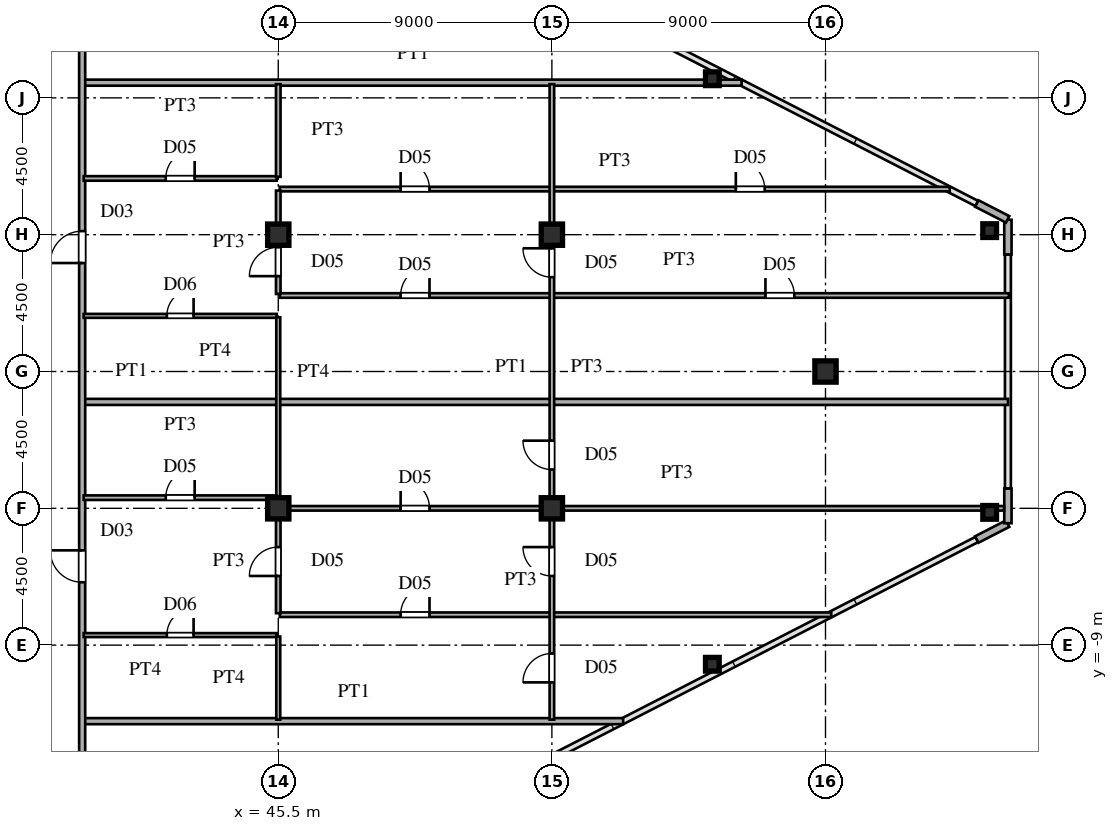
"""IFC4 building model, lengths in metres.
Left out: names, types, materials, properties, quantities, classifications, styles, units other than length and angle.
Written with IfcOpenShell. Run it as: python <this file> out.ifc"""

import sys

from ifc_helpers import new_model, si_unit, direction, frame, frame_2d, origin, origin_2d, place, context, subcontext, project, spatial, rectangle, hollow_rectangle, i_section, extrude, source, transform, mapped, element, fill, save


model = new_model("IFC4")
c1 = context("Model", 3, precision=1e-05, world=origin(), true_north=direction((0.0, 1.0)))
c2 = subcontext(c1, "Body", "Model", "MODEL_VIEW")
j1 = project(units=[si_unit("LENGTHUNIT", "METRE"), si_unit("PLANEANGLEUNIT", "RADIAN")], contexts=[c1])
p1 = place(None, origin())
s1 = spatial("IfcSite", under=j1, at=p1, CompositionType="ELEMENT")
p2 = place(p1, origin())
s2 = spatial("IfcBuilding", under=s1, at=p2, CompositionType="ELEMENT")
p3 = place(p2, frame((0.0, 0.0, 140.4)))
s3 = spatial("IfcBuildingStorey", under=s2, at=p3, CompositionType="ELEMENT", Elevation=140.4)
m1 = source(origin(), c2, "Body", "SweptSolid", [
    extrude(i_section(OverallWidth=0.7, OverallDepth=0.7, WebThickness=0.028, FlangeThickness=0.045, at=origin_2d()), origin(), (0.0, 0.0, 1.0), 3.6),
])
for number, where, z_axis, x_axis in (
    (1, (45.5, -4.5, 0.0), (0.0, 0.0, 1.0), (1.0, 0.0, 0.0)),
    (2, (45.5, 4.5, 0.0), (0.0, 0.0, 1.0), (1.0, 0.0, 0.0)),
    (3, (54.5, -4.5, 0.0), (0.0, 0.0, 1.0), (1.0, 0.0, 0.0)),
    (4, (54.5, 4.5, 0.0), (0.0, 0.0, 1.0), (1.0, 0.0, 0.0)),
    (5, (63.5, 0.0, 0.0), (0.0, 0.0, 1.0), (1.0, 0.0, 0.0)),
):
    element("IfcColumn", number, at=place(p3, frame(where, z_axis=z_axis, x_axis=x_axis)), inside=s3, PredefinedType="COLUMN", context=c2, shape_type="MappedRepresentation", body=[
        mapped(m1, transform((0.0, 0.0, 0.0), scale=1.0)),
    ])
m2 = source(origin(), c2, "Body", "SweptSolid", [
    extrude(hollow_rectangle(XDim=0.45, YDim=0.45, WallThickness=0.018, at=origin_2d()), origin(), (0.0, 0.0, 1.0), 3.6),
])
for number, where, z_axis, x_axis in (
    (6, (68.9, -4.634, 0.0), (0.0, 0.0, 1.0), (1.0, 0.0, 0.0)),
    (7, (68.9, 4.634, 0.0), (0.0, 0.0, 1.0), (1.0, 0.0, 0.0)),
    (8, (59.779, -9.629, 0.0), (0.0, 0.0, 1.0), (1.0, 0.0, 0.0)),
    (9, (59.779, 9.629, 0.0), (0.0, 0.0, 1.0), (1.0, 0.0, 0.0)),
):
    element("IfcColumn", number, at=place(p3, frame(where, z_axis=z_axis, x_axis=x_axis)), inside=s3, PredefinedType="COLUMN", context=c2, shape_type="MappedRepresentation", body=[
        mapped(m2, transform((0.0, 0.0, 0.0), scale=1.0)),
    ])
p4 = place(p3, frame((68.477, -5.525, 0.0), z_axis=(0.0, 0.0, 1.0), x_axis=(0.889797395748, 0.456355776255, 0.0)))
e10 = element("IfcWall", 10, at=p4, inside=s3, PredefinedType="SOLIDWALL", context=c2, shape_type="SweptSolid", body=[
    extrude(rectangle(XDim=1.14, YDim=0.24, at=frame_2d((0.57, 0.0))), origin(), (0.0, 0.0, 1.0), 3.38),
])
for number, where, z_axis, x_axis in (
    (11, (69.5, -4.99, 0.0), (0.0, 0.0, 1.0), (0.0, 1.0, 0.0)),
    (12, (69.5, 3.85, 0.0), (0.0, 0.0, 1.0), (0.0, 1.0, 0.0)),
):
    element("IfcWall", number, at=place(p3, frame(where, z_axis=z_axis, x_axis=x_axis)), inside=s3, PredefinedType="SOLIDWALL", context=c2, shape_type="SweptSolid", body=[
        extrude(rectangle(XDim=1.14, YDim=0.24, at=frame_2d((0.57, 0.0))), origin(), (0.0, 0.0, 1.0), 3.38),
    ])
p5 = place(p3, frame((69.491, 5.005, 0.0), z_axis=(0.0, 0.0, 1.0), x_axis=(-0.889797395748, 0.456355776255, 0.0)))
e13 = element("IfcWall", 13, at=p5, inside=s3, PredefinedType="SOLIDWALL", context=c2, shape_type="SweptSolid", body=[
    extrude(rectangle(XDim=1.14, YDim=0.24, at=frame_2d((0.57, 0.0))), origin(), (0.0, 0.0, 1.0), 3.38),
])
p6 = place(p3, frame((39.13, -11.5, 0.0), z_axis=(0.0, 0.0, 1.0), x_axis=(1.0, 0.0, 0.0)))
e14 = element("IfcWall", 14, at=p6, inside=s3, PredefinedType="PARTITIONING", context=c2, shape_type="SweptSolid", body=[
    extrude(rectangle(XDim=17.714, YDim=0.2, at=frame_2d((8.857, 0.0))), origin(), (0.0, 0.0, 1.0), 3.38),
])
p7 = place(p3, frame((39.1, -8.67, 0.0), z_axis=(0.0, 0.0, 1.0), x_axis=(1.0, 0.0, 0.0)))
e15 = element("IfcWall", 15, at=p7, inside=s3, PredefinedType="PARTITIONING", context=c2, shape_type="SweptSolid", body=[
    extrude(rectangle(XDim=6.35, YDim=0.13, at=frame_2d((3.175, 0.0))), origin(), (0.0, 0.0, 1.0), 3.38),
])
p8 = place(p7, frame((2.735, 0.0, 0.0)))
e16 = element("IfcOpeningElement", 16, at=p8, cuts=e15, PredefinedType="OPENING", context=c2, shape_type="SweptSolid", body=[
    extrude(rectangle(XDim=0.88, YDim=2.1, at=frame_2d((0.44, 1.05))), frame((0.0, 0.075, 0.0), z_axis=(0.0, -1.0, 0.0), x_axis=(1.0, 0.0, 0.0)), (0.0, 0.0, 1.0), 0.15),
])
p9 = place(p3, frame((45.55, -8.0, 0.0), z_axis=(0.0, 0.0, 1.0), x_axis=(1.0, 0.0, 0.0)))
e17 = element("IfcWall", 17, at=p9, inside=s3, PredefinedType="PARTITIONING", context=c2, shape_type="SweptSolid", body=[
    extrude(rectangle(XDim=18.139, YDim=0.15, at=frame_2d((9.069, 0.0))), origin(), (0.0, 0.0, 1.0), 3.38),
])
p10 = place(p9, frame((3.975, 0.0, 0.0)))
e18 = element("IfcOpeningElement", 18, at=p10, cuts=e17, PredefinedType="OPENING", context=c2, shape_type="SweptSolid", body=[
    extrude(rectangle(XDim=0.95, YDim=2.15, at=frame_2d((0.475, 1.075))), frame((0.0, 0.085, 0.0), z_axis=(0.0, -1.0, 0.0), x_axis=(1.0, 0.0, 0.0)), (0.0, 0.0, 1.0), 0.17),
])
p11 = place(p3, frame((45.55, -4.5, 0.0), z_axis=(0.0, 0.0, 1.0), x_axis=(1.0, 0.0, 0.0)))
e19 = element("IfcWall", 19, at=p11, inside=s3, PredefinedType="PARTITIONING", context=c2, shape_type="SweptSolid", body=[
    extrude(rectangle(XDim=23.825, YDim=0.15, at=frame_2d((11.913, 0.0))), origin(), (0.0, 0.0, 1.0), 2.78),
])
p12 = place(p11, frame((3.975, 0.0, 0.0)))
e20 = element("IfcOpeningElement", 20, at=p12, cuts=e19, PredefinedType="OPENING", context=c2, shape_type="SweptSolid", body=[
    extrude(rectangle(XDim=0.95, YDim=2.15, at=frame_2d((0.475, 1.075))), frame((0.0, 0.085, 0.0), z_axis=(0.0, -1.0, 0.0), x_axis=(1.0, 0.0, 0.0)), (0.0, 0.0, 1.0), 0.17),
])
p13 = place(p3, frame((39.1, -4.15, 0.0), z_axis=(0.0, 0.0, 1.0), x_axis=(1.0, 0.0, 0.0)))
e21 = element("IfcWall", 21, at=p13, inside=s3, PredefinedType="PARTITIONING", context=c2, shape_type="SweptSolid", body=[
    extrude(rectangle(XDim=6.35, YDim=0.15, at=frame_2d((3.175, 0.0))), origin(), (0.0, 0.0, 1.0), 3.38),
])
p14 = place(p13, frame((2.7, 0.0, 0.0)))
e22 = element("IfcOpeningElement", 22, at=p14, cuts=e21, PredefinedType="OPENING", context=c2, shape_type="SweptSolid", body=[
    extrude(rectangle(XDim=0.95, YDim=2.15, at=frame_2d((0.475, 1.075))), frame((0.0, 0.085, 0.0), z_axis=(0.0, -1.0, 0.0), x_axis=(1.0, 0.0, 0.0)), (0.0, 0.0, 1.0), 0.17),
])
p15 = place(p3, frame((39.13, -1.0, 0.0), z_axis=(0.0, 0.0, 1.0), x_axis=(1.0, 0.0, 0.0)))
e23 = element("IfcWall", 23, at=p15, inside=s3, PredefinedType="PARTITIONING", context=c2, shape_type="SweptSolid", body=[
    extrude(rectangle(XDim=30.375, YDim=0.2, at=frame_2d((15.188, 0.0))), origin(), (0.0, 0.0, 1.0), 3.38),
])
p16 = place(p3, frame((39.1, 1.83, 0.0), z_axis=(0.0, 0.0, 1.0), x_axis=(1.0, 0.0, 0.0)))
e24 = element("IfcWall", 24, at=p16, inside=s3, PredefinedType="PARTITIONING", context=c2, shape_type="SweptSolid", body=[
    extrude(rectangle(XDim=6.35, YDim=0.13, at=frame_2d((3.175, 0.0))), origin(), (0.0, 0.0, 1.0), 3.38),
])
p17 = place(p16, frame((2.735, 0.0, 0.0)))
e25 = element("IfcOpeningElement", 25, at=p17, cuts=e24, PredefinedType="OPENING", context=c2, shape_type="SweptSolid", body=[
    extrude(rectangle(XDim=0.88, YDim=2.1, at=frame_2d((0.44, 1.05))), frame((0.0, 0.075, 0.0), z_axis=(0.0, -1.0, 0.0), x_axis=(1.0, 0.0, 0.0)), (0.0, 0.0, 1.0), 0.15),
])
p18 = place(p3, frame((45.55, 2.5, 0.0), z_axis=(0.0, 0.0, 1.0), x_axis=(1.0, 0.0, 0.0)))
e26 = element("IfcWall", 26, at=p18, inside=s3, PredefinedType="PARTITIONING", context=c2, shape_type="SweptSolid", body=[
    extrude(rectangle(XDim=23.985, YDim=0.15, at=frame_2d((11.992, 0.0))), origin(), (0.0, 0.0, 1.0), 3.38),
])
p19 = place(p18, frame((3.975, 0.0, 0.0)))
e27 = element("IfcOpeningElement", 27, at=p19, cuts=e26, PredefinedType="OPENING", context=c2, shape_type="SweptSolid", body=[
    extrude(rectangle(XDim=0.95, YDim=2.15, at=frame_2d((0.475, 1.075))), frame((0.0, 0.085, 0.0), z_axis=(0.0, -1.0, 0.0), x_axis=(1.0, 0.0, 0.0)), (0.0, 0.0, 1.0), 0.17),
])
p20 = place(p18, frame((15.975, 0.0, 0.0)))
e28 = element("IfcOpeningElement", 28, at=p20, cuts=e26, PredefinedType="OPENING", context=c2, shape_type="SweptSolid", body=[
    extrude(rectangle(XDim=0.95, YDim=2.15, at=frame_2d((0.475, 1.075))), frame((0.0, 0.085, 0.0), z_axis=(0.0, -1.0, 0.0), x_axis=(1.0, 0.0, 0.0)), (0.0, 0.0, 1.0), 0.17),
])
p21 = place(p3, frame((45.55, 6.0, 0.0), z_axis=(0.0, 0.0, 1.0), x_axis=(1.0, 0.0, 0.0)))
e29 = element("IfcWall", 29, at=p21, inside=s3, PredefinedType="PARTITIONING", context=c2, shape_type="SweptSolid", body=[
    extrude(rectangle(XDim=22.036, YDim=0.15, at=frame_2d((11.018, 0.0))), origin(), (0.0, 0.0, 1.0), 3.38),
])
p22 = place(p21, frame((3.975, 0.0, 0.0)))
e30 = element("IfcOpeningElement", 30, at=p22, cuts=e29, PredefinedType="OPENING", context=c2, shape_type="SweptSolid", body=[
    extrude(rectangle(XDim=0.95, YDim=2.15, at=frame_2d((0.475, 1.075))), frame((0.0, 0.085, 0.0), z_axis=(0.0, -1.0, 0.0), x_axis=(1.0, 0.0, 0.0)), (0.0, 0.0, 1.0), 0.17),
])
p23 = place(p21, frame((15.001, 0.0, 0.0)))
e31 = element("IfcOpeningElement", 31, at=p23, cuts=e29, PredefinedType="OPENING", context=c2, shape_type="SweptSolid", body=[
    extrude(rectangle(XDim=0.95, YDim=2.15, at=frame_2d((0.475, 1.075))), frame((0.0, 0.085, 0.0), z_axis=(0.0, -1.0, 0.0), x_axis=(1.0, 0.0, 0.0)), (0.0, 0.0, 1.0), 0.17),
])
p24 = place(p3, frame((39.1, 6.35, 0.0), z_axis=(0.0, 0.0, 1.0), x_axis=(1.0, 0.0, 0.0)))
e32 = element("IfcWall", 32, at=p24, inside=s3, PredefinedType="PARTITIONING", context=c2, shape_type="SweptSolid", body=[
    extrude(rectangle(XDim=6.35, YDim=0.15, at=frame_2d((3.175, 0.0))), origin(), (0.0, 0.0, 1.0), 3.38),
])
p25 = place(p24, frame((2.7, 0.0, 0.0)))
e33 = element("IfcOpeningElement", 33, at=p25, cuts=e32, PredefinedType="OPENING", context=c2, shape_type="SweptSolid", body=[
    extrude(rectangle(XDim=0.95, YDim=2.15, at=frame_2d((0.475, 1.075))), frame((0.0, 0.085, 0.0), z_axis=(0.0, -1.0, 0.0), x_axis=(1.0, 0.0, 0.0)), (0.0, 0.0, 1.0), 0.17),
])
p26 = place(p3, frame((39.13, 9.5, 0.0), z_axis=(0.0, 0.0, 1.0), x_axis=(1.0, 0.0, 0.0)))
e34 = element("IfcWall", 34, at=p26, inside=s3, PredefinedType="PARTITIONING", context=c2, shape_type="SweptSolid", body=[
    extrude(rectangle(XDim=21.612, YDim=0.2, at=frame_2d((10.806, 0.0))), origin(), (0.0, 0.0, 1.0), 3.38),
])
p27 = place(p3, frame((39.05, -15.715, 0.0), z_axis=(0.0, 0.0, 1.0), x_axis=(0.0, 1.0, 0.0)))
e35 = element("IfcWall", 35, at=p27, inside=s3, PredefinedType="PARTITIONING", context=c2, shape_type="SweptSolid", body=[
    extrude(rectangle(XDim=31.43, YDim=0.2, at=frame_2d((15.715, 0.0))), origin(), (0.0, 0.0, 1.0), 3.38),
])
p28 = place(p27, frame((1.54, 0.0, 0.0)))
e36 = element("IfcOpeningElement", 36, at=p28, cuts=e35, PredefinedType="OPENING", context=c2, shape_type="SweptSolid", body=[
    extrude(rectangle(XDim=1.05, YDim=2.25, at=frame_2d((0.525, 1.125))), frame((0.0, 0.11, 0.0), z_axis=(0.0, -1.0, 0.0), x_axis=(1.0, 0.0, 0.0)), (0.0, 0.0, 1.0), 0.22),
])
p29 = place(p27, frame((8.782, 0.0, 0.0)))
e37 = element("IfcOpeningElement", 37, at=p29, cuts=e35, PredefinedType="OPENING", context=c2, shape_type="SweptSolid", body=[
    extrude(rectangle(XDim=1.05, YDim=2.25, at=frame_2d((0.525, 1.125))), frame((0.0, 0.11, 0.0), z_axis=(0.0, -1.0, 0.0), x_axis=(1.0, 0.0, 0.0)), (0.0, 0.0, 1.0), 0.22),
])
p30 = place(p27, frame((19.282, 0.0, 0.0)))
e38 = element("IfcOpeningElement", 38, at=p30, cuts=e35, PredefinedType="OPENING", context=c2, shape_type="SweptSolid", body=[
    extrude(rectangle(XDim=1.05, YDim=2.25, at=frame_2d((0.525, 1.125))), frame((0.0, 0.11, 0.0), z_axis=(0.0, -1.0, 0.0), x_axis=(1.0, 0.0, 0.0)), (0.0, 0.0, 1.0), 0.22),
])
p31 = place(p27, frame((27.84, 0.0, 0.0)))
e39 = element("IfcOpeningElement", 39, at=p31, cuts=e35, PredefinedType="OPENING", context=c2, shape_type="SweptSolid", body=[
    extrude(rectangle(XDim=1.05, YDim=2.25, at=frame_2d((0.525, 1.125))), frame((0.0, 0.11, 0.0), z_axis=(0.0, -1.0, 0.0), x_axis=(1.0, 0.0, 0.0)), (0.0, 0.0, 1.0), 0.22),
])
p32 = place(p3, frame((45.5, -11.45, 0.0), z_axis=(0.0, 0.0, 1.0), x_axis=(0.0, 1.0, 0.0)))
e40 = element("IfcWall", 40, at=p32, inside=s3, PredefinedType="PARTITIONING", context=c2, shape_type="SweptSolid", body=[
    extrude(rectangle(XDim=2.733, YDim=0.13, at=frame_2d((1.366, 0.0))), origin(), (0.0, 0.0, 1.0), 2.78),
])
p33 = place(p3, frame((45.5, -7.95, 0.0), z_axis=(0.0, 0.0, 1.0), x_axis=(0.0, 1.0, 0.0)))
e41 = element("IfcWall", 41, at=p33, inside=s3, PredefinedType="PARTITIONING", context=c2, shape_type="SweptSolid", body=[
    extrude(rectangle(XDim=3.4, YDim=0.15, at=frame_2d((1.7, 0.0))), origin(), (0.0, 0.0, 1.0), 2.78),
])
p34 = place(p33, frame((1.225, 0.0, 0.0)))
e42 = element("IfcOpeningElement", 42, at=p34, cuts=e41, PredefinedType="OPENING", context=c2, shape_type="SweptSolid", body=[
    extrude(rectangle(XDim=0.95, YDim=2.15, at=frame_2d((0.475, 1.075))), frame((0.0, 0.085, 0.0), z_axis=(0.0, -1.0, 0.0), x_axis=(1.0, 0.0, 0.0)), (0.0, 0.0, 1.0), 0.17),
])
p35 = place(p3, frame((45.5, -4.098, 0.0), z_axis=(0.0, 0.0, 1.0), x_axis=(0.0, 1.0, 0.0)))
e43 = element("IfcWall", 43, at=p35, inside=s3, PredefinedType="PARTITIONING", context=c2, shape_type="SweptSolid", body=[
    extrude(rectangle(XDim=5.881, YDim=0.13, at=frame_2d((2.94, 0.0))), origin(), (0.0, 0.0, 1.0), 2.78),
])
p36 = place(p3, frame((45.5, 2.55, 0.0), z_axis=(0.0, 0.0, 1.0), x_axis=(0.0, 1.0, 0.0)))
e44 = element("IfcWall", 44, at=p36, inside=s3, PredefinedType="PARTITIONING", context=c2, shape_type="SweptSolid", body=[
    extrude(rectangle(XDim=3.4, YDim=0.15, at=frame_2d((1.7, 0.0))), origin(), (0.0, 0.0, 1.0), 2.78),
])
p37 = place(p36, frame((0.586, 0.0, 0.0)))
e45 = element("IfcOpeningElement", 45, at=p37, cuts=e44, PredefinedType="OPENING", context=c2, shape_type="SweptSolid", body=[
    extrude(rectangle(XDim=0.95, YDim=2.15, at=frame_2d((0.475, 1.075))), frame((0.0, 0.085, 0.0), z_axis=(0.0, -1.0, 0.0), x_axis=(1.0, 0.0, 0.0)), (0.0, 0.0, 1.0), 0.17),
])
p38 = place(p3, frame((45.5, 6.402, 0.0), z_axis=(0.0, 0.0, 1.0), x_axis=(0.0, 1.0, 0.0)))
e46 = element("IfcWall", 46, at=p38, inside=s3, PredefinedType="PARTITIONING", context=c2, shape_type="SweptSolid", body=[
    extrude(rectangle(XDim=3.048, YDim=0.15, at=frame_2d((1.524, 0.0))), origin(), (0.0, 0.0, 1.0), 2.78),
])
p39 = place(p3, frame((54.5, -11.45, 0.0), z_axis=(0.0, 0.0, 1.0), x_axis=(0.0, 1.0, 0.0)))
e47 = element("IfcWall", 47, at=p39, inside=s3, PredefinedType="PARTITIONING", context=c2, shape_type="SweptSolid", body=[
    extrude(rectangle(XDim=20.9, YDim=0.15, at=frame_2d((10.45, 0.0))), origin(), (0.0, 0.0, 1.0), 2.78),
])
p40 = place(p39, frame((4.725, 0.0, 0.0)))
e48 = element("IfcOpeningElement", 48, at=p40, cuts=e47, PredefinedType="OPENING", context=c2, shape_type="SweptSolid", body=[
    extrude(rectangle(XDim=0.95, YDim=2.15, at=frame_2d((0.475, 1.075))), frame((0.0, 0.085, 0.0), z_axis=(0.0, -1.0, 0.0), x_axis=(1.0, 0.0, 0.0)), (0.0, 0.0, 1.0), 0.17),
])
p41 = place(p39, frame((1.225, 0.0, 0.0)))
e49 = element("IfcOpeningElement", 49, at=p41, cuts=e47, PredefinedType="OPENING", context=c2, shape_type="SweptSolid", body=[
    extrude(rectangle(XDim=0.95, YDim=2.15, at=frame_2d((0.475, 1.075))), frame((0.0, 0.085, 0.0), z_axis=(0.0, -1.0, 0.0), x_axis=(1.0, 0.0, 0.0)), (0.0, 0.0, 1.0), 0.17),
])
p42 = place(p39, frame((8.225, 0.0, 0.0)))
e50 = element("IfcOpeningElement", 50, at=p42, cuts=e47, PredefinedType="OPENING", context=c2, shape_type="SweptSolid", body=[
    extrude(rectangle(XDim=0.95, YDim=2.15, at=frame_2d((0.475, 1.075))), frame((0.0, 0.085, 0.0), z_axis=(0.0, -1.0, 0.0), x_axis=(1.0, 0.0, 0.0)), (0.0, 0.0, 1.0), 0.17),
])
p43 = place(p39, frame((14.552, 0.0, 0.0)))
e51 = element("IfcOpeningElement", 51, at=p43, cuts=e47, PredefinedType="OPENING", context=c2, shape_type="SweptSolid", body=[
    extrude(rectangle(XDim=0.95, YDim=2.15, at=frame_2d((0.475, 1.075))), frame((0.0, 0.085, 0.0), z_axis=(0.0, -1.0, 0.0), x_axis=(1.0, 0.0, 0.0)), (0.0, 0.0, 1.0), 0.17),
])
m3 = source(origin(), c2, "Body", "SweptSolid", [
    extrude(rectangle(XDim=0.88, YDim=2.1, at=frame_2d((0.44, 1.05))), frame((0.0, 0.025, 0.0), z_axis=(0.0, -1.0, 0.0), x_axis=(1.0, 0.0, 0.0)), (0.0, 0.0, 1.0), 0.05),
])
p44 = place(p8, origin())
e52 = element("IfcDoor", 52, at=p44, inside=s3, OperationType="SINGLE_SWING_RIGHT", PredefinedType="DOOR", context=c2, shape_type="MappedRepresentation", body=[
    mapped(m3, transform((0.0, 0.0, 0.0), scale=1.0)),
])
fill(e16, e52)
m4 = source(origin(), c2, "Body", "SweptSolid", [
    extrude(rectangle(XDim=0.95, YDim=2.15, at=frame_2d((0.475, 1.075))), frame((0.0, 0.025, 0.0), z_axis=(0.0, -1.0, 0.0), x_axis=(1.0, 0.0, 0.0)), (0.0, 0.0, 1.0), 0.05),
])
p45 = place(p10, origin())
e53 = element("IfcDoor", 53, at=p45, inside=s3, OperationType="SINGLE_SWING_RIGHT", PredefinedType="DOOR", context=c2, shape_type="MappedRepresentation", body=[
    mapped(m4, transform((0.0, 0.0, 0.0), scale=1.0)),
])
fill(e18, e53)
p46 = place(p12, origin())
e54 = element("IfcDoor", 54, at=p46, inside=s3, OperationType="SINGLE_SWING_LEFT", PredefinedType="DOOR", context=c2, shape_type="MappedRepresentation", body=[
    mapped(m4, transform((0.0, 0.0, 0.0), scale=1.0)),
])
fill(e20, e54)
p47 = place(p14, origin())
e55 = element("IfcDoor", 55, at=p47, inside=s3, OperationType="SINGLE_SWING_RIGHT", PredefinedType="DOOR", context=c2, shape_type="MappedRepresentation", body=[
    mapped(m4, transform((0.0, 0.0, 0.0), scale=1.0)),
])
fill(e22, e55)
p48 = place(p17, origin())
e56 = element("IfcDoor", 56, at=p48, inside=s3, OperationType="SINGLE_SWING_RIGHT", PredefinedType="DOOR", context=c2, shape_type="MappedRepresentation", body=[
    mapped(m3, transform((0.0, 0.0, 0.0), scale=1.0)),
])
fill(e25, e56)
p49 = place(p19, origin())
e57 = element("IfcDoor", 57, at=p49, inside=s3, OperationType="SINGLE_SWING_RIGHT", PredefinedType="DOOR", context=c2, shape_type="MappedRepresentation", body=[
    mapped(m4, transform((0.0, 0.0, 0.0), scale=1.0)),
])
fill(e27, e57)
p50 = place(p20, origin())
e58 = element("IfcDoor", 58, at=p50, inside=s3, OperationType="SINGLE_SWING_LEFT", PredefinedType="DOOR", context=c2, shape_type="MappedRepresentation", body=[
    mapped(m4, transform((0.0, 0.0, 0.0), scale=1.0)),
])
fill(e28, e58)
p51 = place(p22, origin())
e59 = element("IfcDoor", 59, at=p51, inside=s3, OperationType="SINGLE_SWING_LEFT", PredefinedType="DOOR", context=c2, shape_type="MappedRepresentation", body=[
    mapped(m4, transform((0.0, 0.0, 0.0), scale=1.0)),
])
fill(e30, e59)
p52 = place(p23, origin())
e60 = element("IfcDoor", 60, at=p52, inside=s3, OperationType="SINGLE_SWING_LEFT", PredefinedType="DOOR", context=c2, shape_type="MappedRepresentation", body=[
    mapped(m4, transform((0.0, 0.0, 0.0), scale=1.0)),
])
fill(e31, e60)
p53 = place(p25, origin())
e61 = element("IfcDoor", 61, at=p53, inside=s3, OperationType="SINGLE_SWING_RIGHT", PredefinedType="DOOR", context=c2, shape_type="MappedRepresentation", body=[
    mapped(m4, transform((0.0, 0.0, 0.0), scale=1.0)),
])
fill(e33, e61)
m5 = source(origin(), c2, "Body", "SweptSolid", [
    extrude(rectangle(XDim=1.05, YDim=2.25, at=frame_2d((0.525, 1.125))), frame((0.0, 0.025, 0.0), z_axis=(0.0, -1.0, 0.0), x_axis=(1.0, 0.0, 0.0)), (0.0, 0.0, 1.0), 0.05),
])
p54 = place(p29, origin())
e62 = element("IfcDoor", 62, at=p54, inside=s3, OperationType="SINGLE_SWING_RIGHT", PredefinedType="DOOR", context=c2, shape_type="MappedRepresentation", body=[
    mapped(m5, transform((0.0, 0.0, 0.0), scale=1.0)),
])
fill(e37, e62)
p55 = place(p30, origin())
e63 = element("IfcDoor", 63, at=p55, inside=s3, OperationType="SINGLE_SWING_LEFT", PredefinedType="DOOR", context=c2, shape_type="MappedRepresentation", body=[
    mapped(m5, transform((0.0, 0.0, 0.0), scale=1.0)),
])
fill(e38, e63)
p56 = place(p34, origin())
e64 = element("IfcDoor", 64, at=p56, inside=s3, OperationType="SINGLE_SWING_LEFT", PredefinedType="DOOR", context=c2, shape_type="MappedRepresentation", body=[
    mapped(m4, transform((0.0, 0.0, 0.0), scale=1.0)),
])
fill(e42, e64)
p57 = place(p37, origin())
e65 = element("IfcDoor", 65, at=p57, inside=s3, OperationType="SINGLE_SWING_LEFT", PredefinedType="DOOR", context=c2, shape_type="MappedRepresentation", body=[
    mapped(m4, transform((0.0, 0.0, 0.0), scale=1.0)),
])
fill(e45, e65)
p58 = place(p40, origin())
e66 = element("IfcDoor", 66, at=p58, inside=s3, OperationType="SINGLE_SWING_RIGHT", PredefinedType="DOOR", context=c2, shape_type="MappedRepresentation", body=[
    mapped(m4, transform((0.0, 0.0, 0.0), scale=1.0)),
])
fill(e48, e66)
p59 = place(p41, origin())
e67 = element("IfcDoor", 67, at=p59, inside=s3, OperationType="SINGLE_SWING_LEFT", PredefinedType="DOOR", context=c2, shape_type="MappedRepresentation", body=[
    mapped(m4, transform((0.0, 0.0, 0.0), scale=1.0)),
])
fill(e49, e67)
p60 = place(p42, origin())
e68 = element("IfcDoor", 68, at=p60, inside=s3, OperationType="SINGLE_SWING_RIGHT", PredefinedType="DOOR", context=c2, shape_type="MappedRepresentation", body=[
    mapped(m4, transform((0.0, 0.0, 0.0), scale=1.0)),
])
fill(e50, e68)
p61 = place(p43, origin())
e69 = element("IfcDoor", 69, at=p61, inside=s3, OperationType="SINGLE_SWING_RIGHT", PredefinedType="DOOR", context=c2, shape_type="MappedRepresentation", body=[
    mapped(m4, transform((0.0, 0.0, 0.0), scale=1.0)),
])
fill(e51, e69)
save(model, sys.argv[1])
